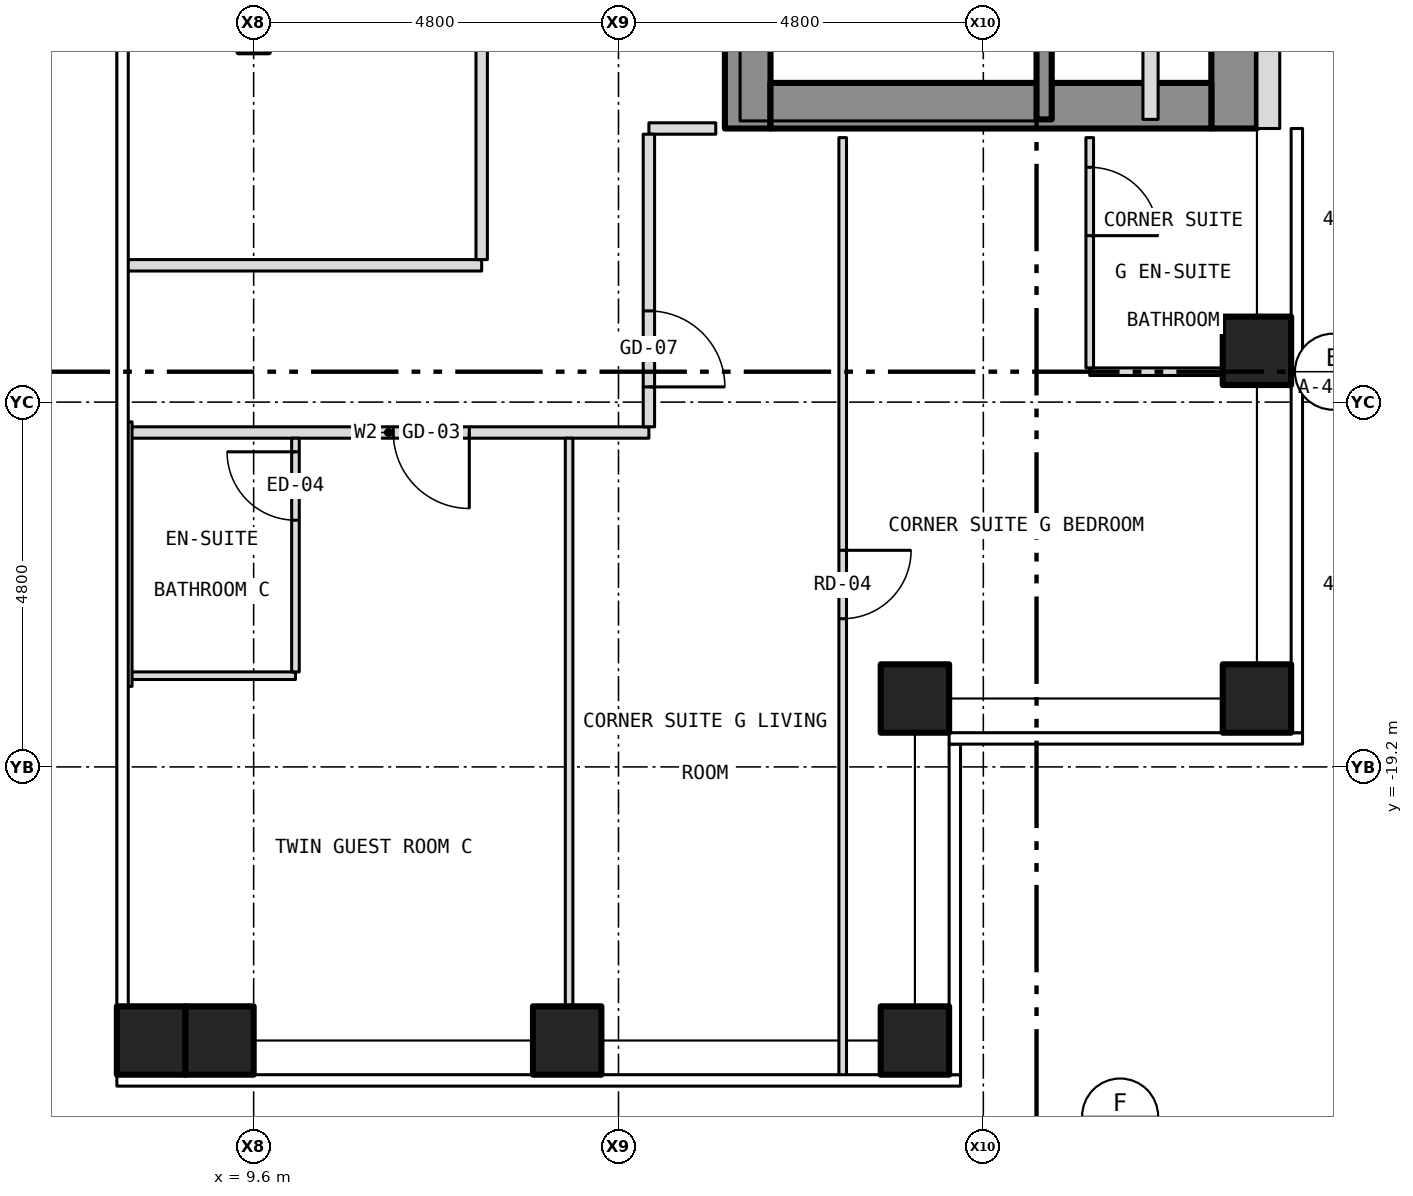
"""IFC4 building model, lengths in metres.
Left out: names, types, materials, properties, quantities, classifications, styles, units other than length and angle.
Written with IfcOpenShell. Run it as: python <this file> out.ifc"""

import sys

from ifc_helpers import new_model, si_unit, direction, frame, frame_2d, origin, origin_2d, place, context, subcontext, project, spatial, rectangle, hollow_rectangle, extrude, element, fill, save


model = new_model("IFC4")
c1 = context("Model", 3, precision=1e-05, world=origin(), true_north=direction((0.0, 1.0)))
c2 = subcontext(c1, "Body", "Model", "MODEL_VIEW")
j1 = project(units=[si_unit("LENGTHUNIT", "METRE"), si_unit("PLANEANGLEUNIT", "RADIAN")], contexts=[c1])
p1 = place(None, origin())
s1 = spatial("IfcSite", under=j1, at=p1, CompositionType="ELEMENT")
p2 = place(p1, origin())
s2 = spatial("IfcBuilding", under=s1, at=p2, CompositionType="ELEMENT")
p3 = place(p2, frame((0.0, 0.0, 120.5)))
s3 = spatial("IfcBuildingStorey", under=s2, at=p3, CompositionType="ELEMENT", Elevation=120.5)
for number, where, z_axis, x_axis in (
    (1, (9.15, -22.8, -0.15), (0.0, 0.0, 1.0), (1.0, 0.0, 0.0)),
    (2, (13.725, -22.8, -0.15), (0.0, 0.0, 1.0), (1.0, 0.0, 0.0)),
    (3, (18.3, -22.8, -0.15), (0.0, 0.0, 1.0), (1.0, 0.0, 0.0)),
    (4, (22.8, -18.3, -0.15), (0.0, 0.0, 1.0), (1.0, 0.0, 0.0)),
    (5, (22.8, -13.725, -0.15), (0.0, 0.0, 1.0), (1.0, 0.0, 0.0)),
    (6, (18.3, -18.3, -0.15), (0.0, 0.0, 1.0), (1.0, 0.0, 0.0)),
    (7, (8.25, -22.8, -0.15), (0.0, 0.0, 1.0), (1.0, 0.0, 0.0)),
):
    element("IfcColumn", number, at=place(p3, frame(where, z_axis=z_axis, x_axis=x_axis)), inside=s3, PredefinedType="COLUMN", context=c2, shape_type="SweptSolid", body=[
        extrude(hollow_rectangle(XDim=0.9, YDim=0.9, WallThickness=0.05, at=origin_2d()), origin(), (0.0, 0.0, 1.0), 3.5),
    ])
p4 = place(p3, frame((16.1, -10.8, 0.0), z_axis=(0.0, 0.0, 1.0), x_axis=(0.0, 1.0, 0.0)))
e8 = element("IfcWall", 8, at=p4, inside=s3, PredefinedType="SHEAR", context=c2, shape_type="SweptSolid", body=[
    extrude(rectangle(XDim=21.6, YDim=0.6, at=frame_2d((10.8, 0.0))), origin(), (0.0, 0.0, 1.0), 3.25),
])
p5 = place(p4, frame((9.4, 0.0, 0.0)))
e9 = element("IfcOpeningElement", 9, at=p5, cuts=e8, PredefinedType="OPENING", context=c2, shape_type="SweptSolid", body=[
    extrude(rectangle(XDim=1.1, YDim=2.1, at=frame_2d((0.55, 1.05))), frame((0.0, 0.312, 0.0), z_axis=(0.0, -1.0, 0.0), x_axis=(1.0, 0.0, 0.0)), (0.0, 0.0, 1.0), 0.624),
])
p6 = place(p4, frame((11.5, 0.0, 0.0)))
e10 = element("IfcOpeningElement", 10, at=p6, cuts=e8, PredefinedType="OPENING", context=c2, shape_type="SweptSolid", body=[
    extrude(rectangle(XDim=1.1, YDim=2.1, at=frame_2d((0.55, 1.05))), frame((0.0, 0.312, 0.0), z_axis=(0.0, -1.0, 0.0), x_axis=(1.0, 0.0, 0.0)), (0.0, 0.0, 1.0), 0.624),
])
p7 = place(p4, frame((13.6, 0.0, 0.0)))
e11 = element("IfcOpeningElement", 11, at=p7, cuts=e8, PredefinedType="OPENING", context=c2, shape_type="SweptSolid", body=[
    extrude(rectangle(XDim=1.1, YDim=2.1, at=frame_2d((0.55, 1.05))), frame((0.0, 0.312, 0.0), z_axis=(0.0, -1.0, 0.0), x_axis=(1.0, 0.0, 0.0)), (0.0, 0.0, 1.0), 0.624),
])
p8 = place(p4, frame((15.7, 0.0, 0.0)))
e12 = element("IfcOpeningElement", 12, at=p8, cuts=e8, PredefinedType="OPENING", context=c2, shape_type="SweptSolid", body=[
    extrude(rectangle(XDim=1.1, YDim=2.1, at=frame_2d((0.55, 1.05))), frame((0.0, 0.312, 0.0), z_axis=(0.0, -1.0, 0.0), x_axis=(1.0, 0.0, 0.0)), (0.0, 0.0, 1.0), 0.624),
])
p9 = place(p4, frame((17.8, 0.0, 0.0)))
e13 = element("IfcOpeningElement", 13, at=p9, cuts=e8, PredefinedType="OPENING", context=c2, shape_type="SweptSolid", body=[
    extrude(rectangle(XDim=1.1, YDim=2.1, at=frame_2d((0.55, 1.05))), frame((0.0, 0.312, 0.0), z_axis=(0.0, -1.0, 0.0), x_axis=(1.0, 0.0, 0.0)), (0.0, 0.0, 1.0), 0.624),
])
p10 = place(p4, frame((5.642, 0.0, 0.0)))
e14 = element("IfcOpeningElement", 14, at=p10, cuts=e8, PredefinedType="OPENING", context=c2, shape_type="SweptSolid", body=[
    extrude(rectangle(XDim=1.1, YDim=2.1, at=frame_2d((0.55, 1.05))), frame((0.0, 0.312, 0.0), z_axis=(0.0, -1.0, 0.0), x_axis=(1.0, 0.0, 0.0)), (0.0, 0.0, 1.0), 0.624),
])
p11 = place(p4, frame((7.5, 0.0, 0.0)))
e15 = element("IfcOpeningElement", 15, at=p11, cuts=e8, PredefinedType="OPENING", context=c2, shape_type="SweptSolid", body=[
    extrude(rectangle(XDim=1.1, YDim=2.1, at=frame_2d((0.55, 1.05))), frame((0.0, 0.312, 0.0), z_axis=(0.0, -1.0, 0.0), x_axis=(1.0, 0.0, 0.0)), (0.0, 0.0, 1.0), 0.624),
])
p12 = place(p3, frame((22.5, -10.8, 0.0), z_axis=(0.0, 0.0, 1.0), x_axis=(0.0, 1.0, 0.0)))
e16 = element("IfcWall", 16, at=p12, inside=s3, PredefinedType="SHEAR", context=c2, shape_type="SweptSolid", body=[
    extrude(rectangle(XDim=21.6, YDim=0.6, at=frame_2d((10.8, 0.0))), origin(), (0.0, 0.0, 1.0), 3.25),
])
p13 = place(p3, frame((16.4, -10.5, 0.0), z_axis=(0.0, 0.0, 1.0), x_axis=(1.0, 0.0, 0.0)))
e17 = element("IfcWall", 17, at=p13, inside=s3, PredefinedType="SHEAR", context=c2, shape_type="SweptSolid", body=[
    extrude(rectangle(XDim=5.8, YDim=0.6, at=frame_2d((2.9, 0.0))), origin(), (0.0, 0.0, 1.0), 3.25),
])
p14 = place(p3, frame((22.95, -10.8, 0.0), z_axis=(0.0, 0.0, 1.0), x_axis=(0.0, 1.0, 0.0)))
e18 = element("IfcWall", 18, at=p14, inside=s3, PredefinedType="SOLIDWALL", context=c2, shape_type="SweptSolid", body=[
    extrude(rectangle(XDim=21.6, YDim=0.3, at=frame_2d((10.8, 0.0))), origin(), (0.0, 0.0, 1.0), 3.5),
])
p15 = place(p14, frame((2.95, 0.0, 1.0)))
e19 = element("IfcOpeningElement", 19, at=p15, cuts=e18, PredefinedType="OPENING", context=c2, shape_type="SweptSolid", body=[
    extrude(rectangle(XDim=0.6, YDim=1.5, at=frame_2d((0.3, 0.75))), frame((0.0, 0.162, 0.0), z_axis=(0.0, -1.0, 0.0), x_axis=(1.0, 0.0, 0.0)), (0.0, 0.0, 1.0), 0.324),
])
p16 = place(p3, frame((7.95, -18.0, 0.0), z_axis=(0.0, 0.0, 1.0), x_axis=(1.0, 0.0, 0.0)))
e20 = element("IfcWall", 20, at=p16, inside=s3, PredefinedType="PARTITIONING", context=c2, shape_type="SweptSolid", body=[
    extrude(rectangle(XDim=2.2, YDim=0.1, at=frame_2d((1.1, 0.0))), origin(), (0.0, 0.0, 1.0), 3.35),
])
p17 = place(p3, frame((7.95, -14.8, 0.0), z_axis=(0.0, 0.0, 1.0), x_axis=(1.0, 0.0, 0.0)))
e21 = element("IfcWall", 21, at=p17, inside=s3, PredefinedType="PARTITIONING", context=c2, shape_type="SweptSolid", body=[
    extrude(rectangle(XDim=6.85, YDim=0.15, at=frame_2d((3.425, 0.0))), origin(), (0.0, 0.0, 1.0), 3.35),
])
p18 = place(p17, frame((3.487, 0.0, 0.0)))
e22 = element("IfcOpeningElement", 22, at=p18, cuts=e21, PredefinedType="OPENING", context=c2, shape_type="SweptSolid", body=[
    extrude(rectangle(XDim=1.0, YDim=2.1, at=frame_2d((0.5, 1.05))), frame((0.0, 0.087, 0.0), z_axis=(0.0, -1.0, 0.0), x_axis=(1.0, 0.0, 0.0)), (0.0, 0.0, 1.0), 0.174),
])
p19 = place(p3, frame((20.6, -14.0, 0.0), z_axis=(0.0, 0.0, 1.0), x_axis=(1.0, 0.0, 0.0)))
e23 = element("IfcWall", 23, at=p19, inside=s3, PredefinedType="PARTITIONING", context=c2, shape_type="SweptSolid", body=[
    extrude(rectangle(XDim=2.08, YDim=0.1, at=frame_2d((1.04, 0.0))), origin(), (0.0, 0.0, 1.0), 3.35),
])
p20 = place(p3, frame((7.92, -12.6, 0.0), z_axis=(0.0, 0.0, 1.0), x_axis=(1.0, 0.0, 0.0)))
e24 = element("IfcWall", 24, at=p20, inside=s3, PredefinedType="PARTITIONING", context=c2, shape_type="SweptSolid", body=[
    extrude(rectangle(XDim=4.68, YDim=0.15, at=frame_2d((2.34, 0.0))), origin(), (0.0, 0.0, 1.0), 3.35),
])
p21 = place(p3, frame((14.8, -10.8, 0.0), z_axis=(0.0, 0.0, 1.0), x_axis=(1.0, 0.0, 0.0)))
e25 = element("IfcWall", 25, at=p21, inside=s3, PredefinedType="PARTITIONING", context=c2, shape_type="SweptSolid", body=[
    extrude(rectangle(XDim=0.88, YDim=0.15, at=frame_2d((0.44, 0.0))), origin(), (0.0, 0.0, 1.0), 3.35),
])
p22 = place(p3, frame((7.95, -18.14, 0.0), z_axis=(0.0, 0.0, 1.0), x_axis=(0.0, 1.0, 0.0)))
e26 = element("IfcWall", 26, at=p22, inside=s3, PredefinedType="PARTITIONING", context=c2, shape_type="SweptSolid", body=[
    extrude(rectangle(XDim=3.48, YDim=0.1, at=frame_2d((1.74, 0.0))), origin(), (0.0, 0.0, 1.0), 2.733),
])
p23 = place(p3, frame((10.15, -17.95, 0.0), z_axis=(0.0, 0.0, 1.0), x_axis=(0.0, 1.0, 0.0)))
e27 = element("IfcWall", 27, at=p23, inside=s3, PredefinedType="PARTITIONING", context=c2, shape_type="SweptSolid", body=[
    extrude(rectangle(XDim=3.075, YDim=0.1, at=frame_2d((1.538, 0.0))), origin(), (0.0, 0.0, 1.0), 3.35),
])
p24 = place(p23, frame((1.996, 0.0, 0.0)))
e28 = element("IfcOpeningElement", 28, at=p24, cuts=e27, PredefinedType="OPENING", context=c2, shape_type="SweptSolid", body=[
    extrude(rectangle(XDim=0.9, YDim=2.1, at=frame_2d((0.45, 1.05))), frame((0.0, 0.062, 0.0), z_axis=(0.0, -1.0, 0.0), x_axis=(1.0, 0.0, 0.0)), (0.0, 0.0, 1.0), 0.124),
])
p25 = place(p3, frame((12.6, -12.525, 0.0), z_axis=(0.0, 0.0, 1.0), x_axis=(0.0, 1.0, 0.0)))
e29 = element("IfcWall", 29, at=p25, inside=s3, PredefinedType="PARTITIONING", context=c2, shape_type="SweptSolid", body=[
    extrude(rectangle(XDim=10.525, YDim=0.15, at=frame_2d((5.262, 0.0))), origin(), (0.0, 0.0, 1.0), 3.35),
])
p26 = place(p25, frame((4.825, 0.0, 0.0)))
e30 = element("IfcOpeningElement", 30, at=p26, cuts=e29, PredefinedType="OPENING", context=c2, shape_type="SweptSolid", body=[
    extrude(rectangle(XDim=0.9, YDim=2.1, at=frame_2d((0.45, 1.05))), frame((0.0, 0.087, 0.0), z_axis=(0.0, -1.0, 0.0), x_axis=(1.0, 0.0, 0.0)), (0.0, 0.0, 1.0), 0.174),
])
p27 = place(p3, frame((13.75, -22.68, 0.0), z_axis=(0.0, 0.0, 1.0), x_axis=(0.0, 1.0, 0.0)))
e31 = element("IfcWall", 31, at=p27, inside=s3, PredefinedType="PARTITIONING", context=c2, shape_type="SweptSolid", body=[
    extrude(rectangle(XDim=7.805, YDim=0.1, at=frame_2d((3.902, 0.0))), origin(), (0.0, 0.0, 1.0), 3.35),
])
p28 = place(p3, frame((14.8, -14.725, 0.0), z_axis=(0.0, 0.0, 1.0), x_axis=(0.0, 1.0, 0.0)))
e32 = element("IfcWall", 32, at=p28, inside=s3, PredefinedType="PARTITIONING", context=c2, shape_type="SweptSolid", body=[
    extrude(rectangle(XDim=3.85, YDim=0.15, at=frame_2d((1.925, 0.0))), origin(), (0.0, 0.0, 1.0), 3.35),
])
p29 = place(p28, frame((0.525, 0.0, 0.0)))
e33 = element("IfcOpeningElement", 33, at=p29, cuts=e32, PredefinedType="OPENING", context=c2, shape_type="SweptSolid", body=[
    extrude(rectangle(XDim=1.0, YDim=2.1, at=frame_2d((0.5, 1.05))), frame((0.0, 0.087, 0.0), z_axis=(0.0, -1.0, 0.0), x_axis=(1.0, 0.0, 0.0)), (0.0, 0.0, 1.0), 0.174),
])
p30 = place(p3, frame((17.35, -23.28, 0.0), z_axis=(0.0, 0.0, 1.0), x_axis=(0.0, 1.0, 0.0)))
e34 = element("IfcWall", 34, at=p30, inside=s3, PredefinedType="PARTITIONING", context=c2, shape_type="SweptSolid", body=[
    extrude(rectangle(XDim=12.36, YDim=0.1, at=frame_2d((6.18, 0.0))), origin(), (0.0, 0.0, 1.0), 3.35),
])
p31 = place(p30, frame((6.03, 0.0, 0.0)))
e35 = element("IfcOpeningElement", 35, at=p31, cuts=e34, PredefinedType="OPENING", context=c2, shape_type="SweptSolid", body=[
    extrude(rectangle(XDim=0.9, YDim=2.1, at=frame_2d((0.45, 1.05))), frame((0.0, 0.062, 0.0), z_axis=(0.0, -1.0, 0.0), x_axis=(1.0, 0.0, 0.0)), (0.0, 0.0, 1.0), 0.124),
])
p32 = place(p3, frame((20.0, -10.68, 0.0), z_axis=(0.0, 0.0, 1.0), x_axis=(0.0, 1.0, 0.0)))
e36 = element("IfcWall", 36, at=p32, inside=s3, PredefinedType="SHEAR", context=c2, shape_type="SweptSolid", body=[
    extrude(rectangle(XDim=6.98, YDim=0.2, at=frame_2d((3.49, 0.0))), origin(), (0.0, 0.0, 1.0), 3.25),
])
p33 = place(p3, frame((20.6, -13.95, 0.0), z_axis=(0.0, 0.0, 1.0), x_axis=(0.0, 1.0, 0.0)))
e37 = element("IfcWall", 37, at=p33, inside=s3, PredefinedType="PARTITIONING", context=c2, shape_type="SweptSolid", body=[
    extrude(rectangle(XDim=3.03, YDim=0.1, at=frame_2d((1.515, 0.0))), origin(), (0.0, 0.0, 1.0), 3.35),
])
p34 = place(p33, frame((1.74, 0.0, 0.0)))
e38 = element("IfcOpeningElement", 38, at=p34, cuts=e37, PredefinedType="OPENING", context=c2, shape_type="SweptSolid", body=[
    extrude(rectangle(XDim=0.9, YDim=2.1, at=frame_2d((0.45, 1.05))), frame((0.0, 0.062, 0.0), z_axis=(0.0, -1.0, 0.0), x_axis=(1.0, 0.0, 0.0)), (0.0, 0.0, 1.0), 0.124),
])
p35 = place(p3, frame((21.4, -10.68, 0.0), z_axis=(0.0, 0.0, 1.0), x_axis=(0.0, 1.0, 0.0)))
e39 = element("IfcWall", 39, at=p35, inside=s3, PredefinedType="PARTITIONING", context=c2, shape_type="SweptSolid", body=[
    extrude(rectangle(XDim=8.68, YDim=0.2, at=frame_2d((4.34, 0.0))), origin(), (0.0, 0.0, 1.0), 3.25),
])
p36 = place(p35, frame((3.88, 0.0, 0.0)))
e40 = element("IfcOpeningElement", 40, at=p36, cuts=e39, PredefinedType="OPENING", context=c2, shape_type="SweptSolid", body=[
    extrude(rectangle(XDim=0.9, YDim=2.1, at=frame_2d((0.45, 1.05))), frame((0.0, 0.112, 0.0), z_axis=(0.0, -1.0, 0.0), x_axis=(1.0, 0.0, 0.0)), (0.0, 0.0, 1.0), 0.224),
])
p37 = place(p18, origin())
e41 = element("IfcDoor", 41, at=p37, inside=s3, OperationType="SINGLE_SWING_RIGHT", PredefinedType="DOOR", context=c2, shape_type="SweptSolid", body=[
    extrude(rectangle(XDim=1.0, YDim=2.1, at=frame_2d((0.5, 1.05))), frame((0.0, 0.025, 0.0), z_axis=(0.0, -1.0, 0.0), x_axis=(1.0, 0.0, 0.0)), (0.0, 0.0, 1.0), 0.05),
])
fill(e22, e41)
p38 = place(p24, origin())
e42 = element("IfcDoor", 42, at=p38, inside=s3, OperationType="SINGLE_SWING_RIGHT", PredefinedType="DOOR", context=c2, shape_type="SweptSolid", body=[
    extrude(rectangle(XDim=0.9, YDim=2.1, at=frame_2d((0.45, 1.05))), frame((0.0, 0.025, 0.0), z_axis=(0.0, -1.0, 0.0), x_axis=(1.0, 0.0, 0.0)), (0.0, 0.0, 1.0), 0.05),
])
fill(e28, e42)
p39 = place(p29, origin())
e43 = element("IfcDoor", 43, at=p39, inside=s3, OperationType="SINGLE_SWING_LEFT", PredefinedType="DOOR", context=c2, shape_type="SweptSolid", body=[
    extrude(rectangle(XDim=1.0, YDim=2.1, at=frame_2d((0.5, 1.05))), frame((0.0, 0.025, 0.0), z_axis=(0.0, -1.0, 0.0), x_axis=(1.0, 0.0, 0.0)), (0.0, 0.0, 1.0), 0.05),
])
fill(e33, e43)
p40 = place(p31, origin())
e44 = element("IfcDoor", 44, at=p40, inside=s3, OperationType="SINGLE_SWING_RIGHT", PredefinedType="DOOR", context=c2, shape_type="SweptSolid", body=[
    extrude(rectangle(XDim=0.9, YDim=2.1, at=frame_2d((0.45, 1.05))), frame((0.0, 0.025, 0.0), z_axis=(0.0, -1.0, 0.0), x_axis=(1.0, 0.0, 0.0)), (0.0, 0.0, 1.0), 0.05),
])
fill(e35, e44)
p41 = place(p34, origin())
e45 = element("IfcDoor", 45, at=p41, inside=s3, OperationType="SINGLE_SWING_LEFT", PredefinedType="DOOR", context=c2, shape_type="SweptSolid", body=[
    extrude(rectangle(XDim=0.9, YDim=2.1, at=frame_2d((0.45, 1.05))), frame((0.0, 0.025, 0.0), z_axis=(0.0, -1.0, 0.0), x_axis=(1.0, 0.0, 0.0)), (0.0, 0.0, 1.0), 0.05),
])
fill(e38, e45)
save(model, sys.argv[1])
